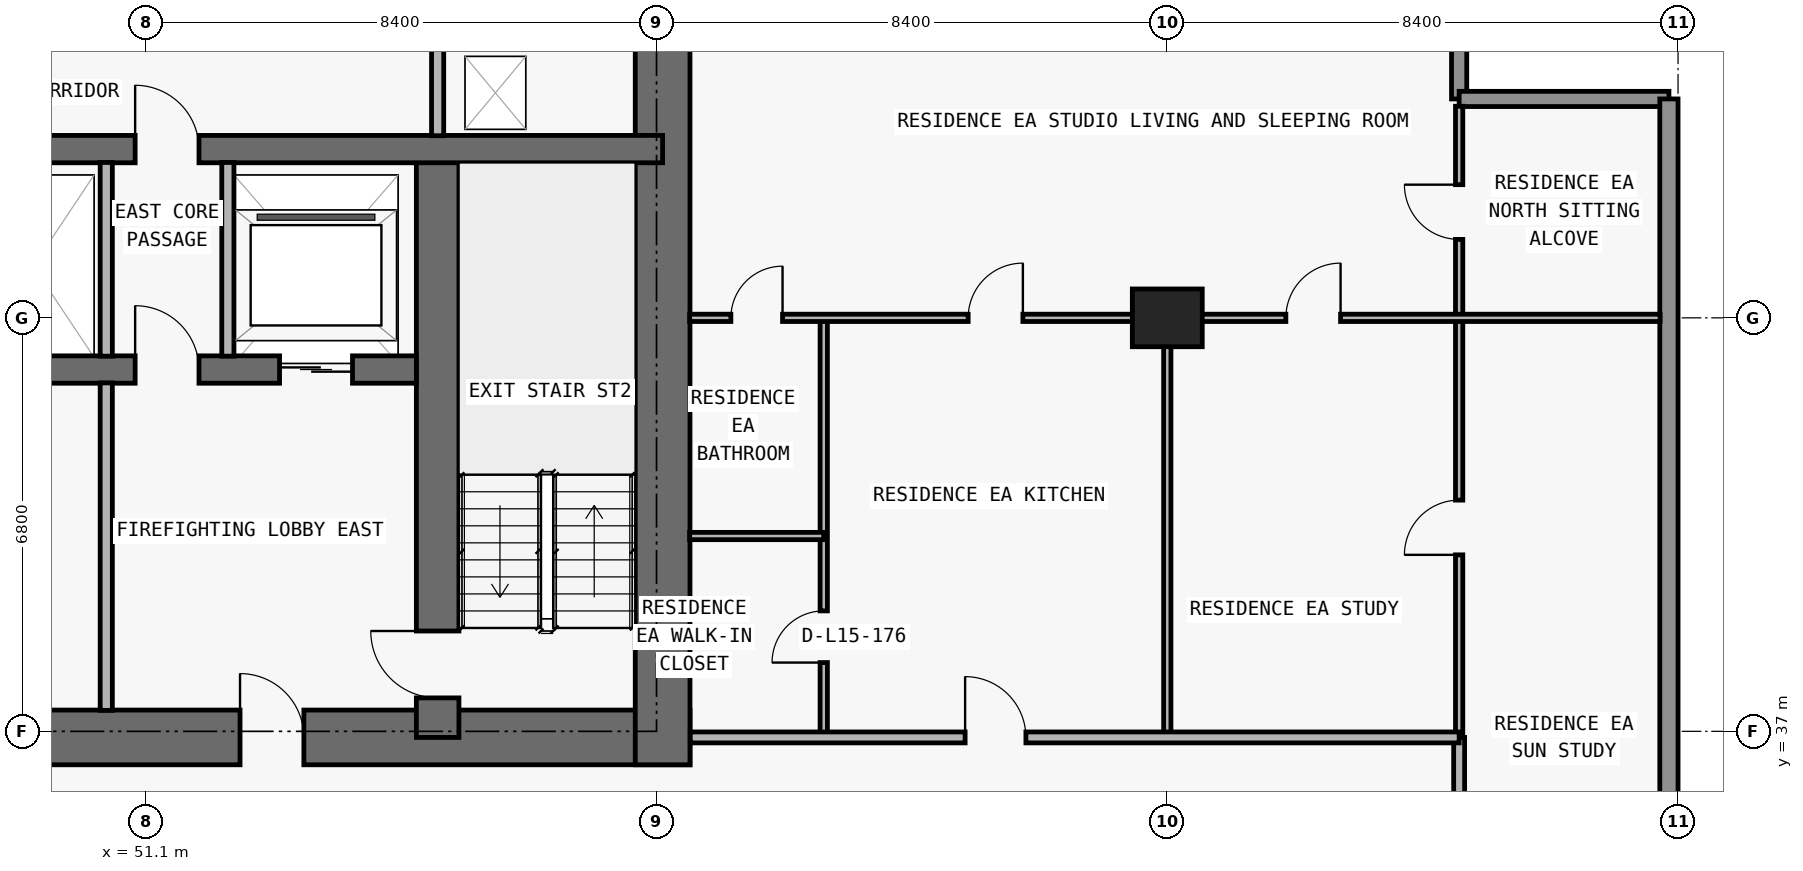
"""IFC4 building model, lengths in metres.
Left out: names, types, materials, properties, quantities, classifications, styles, units other than length and angle.
Written with IfcOpenShell. Run it as: python <this file> out.ifc"""

import sys

from ifc_helpers import new_model, si_unit, direction, frame, frame_2d, origin, origin_2d, place, context, subcontext, project, spatial, rectangle, extrude, element, fill, save


model = new_model("IFC4")
c1 = context("Model", 3, precision=1e-05, world=origin(), true_north=direction((0.0, 1.0)))
c2 = subcontext(c1, "Body", "Model", "MODEL_VIEW")
j1 = project(units=[si_unit("LENGTHUNIT", "METRE"), si_unit("PLANEANGLEUNIT", "RADIAN")], contexts=[c1])
p1 = place(None, origin())
s1 = spatial("IfcSite", under=j1, at=p1, CompositionType="ELEMENT")
p2 = place(p1, origin())
s2 = spatial("IfcBuilding", under=s1, at=p2, CompositionType="ELEMENT")
p3 = place(p2, frame((0.0, 0.0, 59.7)))
s3 = spatial("IfcBuildingStorey", under=s2, at=p3, CompositionType="ELEMENT", Elevation=59.7)
p4 = place(p3, frame((67.9, 43.8, 0.0), z_axis=(0.0, 0.0, 1.0), x_axis=(1.0, 0.0, 0.0)))
e1 = element("IfcColumn", 1, at=p4, inside=s3, PredefinedType="COLUMN", context=c2, shape_type="SweptSolid", body=[
    extrude(rectangle(XDim=1.15, YDim=0.95, at=origin_2d()), origin(), (0.0, 0.0, 1.0), 3.05),
])
p5 = place(p3, frame((17.75, 36.9, 0.0), z_axis=(0.0, 0.0, 1.0), x_axis=(1.0, 0.0, 0.0)))
e2 = element("IfcWall", 2, at=p5, inside=s3, PredefinedType="SHEAR", context=c2, shape_type="SweptSolid", body=[
    extrude(rectangle(XDim=42.3, YDim=0.9, at=frame_2d((21.15, 0.0))), origin(), (0.0, 0.0, 1.0), 3.05),
])
p6 = place(p5, frame((14.55, 0.0, 0.0)))
e3 = element("IfcOpeningElement", 3, at=p6, cuts=e2, PredefinedType="OPENING", context=c2, shape_type="SweptSolid", body=[
    extrude(rectangle(XDim=1.1, YDim=2.15, at=frame_2d((0.55, 1.075))), frame((0.0, 0.46, 0.0), z_axis=(0.0, -1.0, 0.0), x_axis=(1.0, 0.0, 0.0)), (0.0, 0.0, 1.0), 0.92),
])
p7 = place(p5, frame((6.4, 0.0, 0.0)))
e4 = element("IfcOpeningElement", 4, at=p7, cuts=e2, PredefinedType="OPENING", context=c2, shape_type="SweptSolid", body=[
    extrude(rectangle(XDim=1.05, YDim=2.15, at=frame_2d((0.525, 1.075))), frame((0.0, 0.46, 0.0), z_axis=(0.0, -1.0, 0.0), x_axis=(1.0, 0.0, 0.0)), (0.0, 0.0, 1.0), 0.92),
])
p8 = place(p5, frame((34.9, 0.0, 0.0)))
e5 = element("IfcOpeningElement", 5, at=p8, cuts=e2, PredefinedType="OPENING", context=c2, shape_type="SweptSolid", body=[
    extrude(rectangle(XDim=1.05, YDim=2.15, at=frame_2d((0.525, 1.075))), frame((0.0, 0.46, 0.0), z_axis=(0.0, -1.0, 0.0), x_axis=(1.0, 0.0, 0.0)), (0.0, 0.0, 1.0), 0.92),
])
p9 = place(p5, frame((11.012, 0.0, 0.0)))
e6 = element("IfcOpeningElement", 6, at=p9, cuts=e2, PredefinedType="OPENING", context=c2, shape_type="SweptSolid", body=[
    extrude(rectangle(XDim=1.05, YDim=2.15, at=frame_2d((0.525, 1.075))), frame((0.0, 0.46, 0.0), z_axis=(0.0, -1.0, 0.0), x_axis=(1.0, 0.0, 0.0)), (0.0, 0.0, 1.0), 0.92),
])
p10 = place(p5, frame((24.25, 0.0, 0.0)))
e7 = element("IfcOpeningElement", 7, at=p10, cuts=e2, PredefinedType="OPENING", context=c2, shape_type="SweptSolid", body=[
    extrude(rectangle(XDim=1.05, YDim=2.15, at=frame_2d((0.525, 1.075))), frame((0.0, 0.46, 0.0), z_axis=(0.0, -1.0, 0.0), x_axis=(1.0, 0.0, 0.0)), (0.0, 0.0, 1.0), 0.92),
])
p11 = place(p3, frame((59.6, 36.45, 0.0), z_axis=(0.0, 0.0, 1.0), x_axis=(0.0, 1.0, 0.0)))
e8 = element("IfcWall", 8, at=p11, inside=s3, PredefinedType="SHEAR", context=c2, shape_type="SweptSolid", body=[
    extrude(rectangle(XDim=14.15, YDim=0.9, at=frame_2d((7.075, 0.0))), origin(), (0.0, 0.0, 1.0), 3.05),
])
p12 = place(p3, frame((55.9, 36.9, 0.0), z_axis=(0.0, 0.0, 1.0), x_axis=(0.0, 1.0, 0.0)))
e9 = element("IfcWall", 9, at=p12, inside=s3, PredefinedType="SHEAR", context=c2, shape_type="SweptSolid", body=[
    extrude(rectangle(XDim=9.675, YDim=0.7, at=frame_2d((4.837, 0.0))), origin(), (0.0, 0.0, 1.0), 3.05),
])
p13 = place(p12, frame((0.65, 0.0, 0.0)))
e10 = element("IfcOpeningElement", 10, at=p13, cuts=e9, PredefinedType="OPENING", context=c2, shape_type="SweptSolid", body=[
    extrude(rectangle(XDim=1.1, YDim=2.15, at=frame_2d((0.55, 1.075))), frame((0.0, 0.36, 0.0), z_axis=(0.0, -1.0, 0.0), x_axis=(1.0, 0.0, 0.0)), (0.0, 0.0, 1.0), 0.72),
])
p14 = place(p3, frame((22.25, 42.95, 0.0), z_axis=(0.0, 0.0, 1.0), x_axis=(1.0, 0.0, 0.0)))
e11 = element("IfcWall", 11, at=p14, inside=s3, PredefinedType="SHEAR", context=c2, shape_type="SweptSolid", body=[
    extrude(rectangle(XDim=33.3, YDim=0.45, at=frame_2d((16.65, 0.0))), origin(), (0.0, 0.0, 1.0), 3.05),
])
p15 = place(p14, frame((1.05, 0.0, 0.0)))
e12 = element("IfcOpeningElement", 12, at=p15, cuts=e11, PredefinedType="OPENING", context=c2, shape_type="SweptSolid", body=[
    extrude(rectangle(XDim=1.2, YDim=2.2, at=frame_2d((0.6, 1.1))), frame((0.0, 0.235, 0.0), z_axis=(0.0, -1.0, 0.0), x_axis=(1.0, 0.0, 0.0)), (0.0, 0.0, 1.0), 0.47),
])
p16 = place(p14, frame((31.05, 0.0, 0.0)))
e13 = element("IfcOpeningElement", 13, at=p16, cuts=e11, PredefinedType="OPENING", context=c2, shape_type="SweptSolid", body=[
    extrude(rectangle(XDim=1.2, YDim=2.2, at=frame_2d((0.6, 1.1))), frame((0.0, 0.235, 0.0), z_axis=(0.0, -1.0, 0.0), x_axis=(1.0, 0.0, 0.0)), (0.0, 0.0, 1.0), 0.47),
])
p17 = place(p14, frame((13.5, 0.0, 0.0)))
e14 = element("IfcOpeningElement", 14, at=p17, cuts=e11, PredefinedType="OPENING", context=c2, shape_type="SweptSolid", body=[
    extrude(rectangle(XDim=1.1, YDim=2.2, at=frame_2d((0.55, 1.1))), frame((0.0, 0.235, 0.0), z_axis=(0.0, -1.0, 0.0), x_axis=(1.0, 0.0, 0.0)), (0.0, 0.0, 1.0), 0.47),
])
p18 = place(p14, frame((16.1, 0.0, 0.0)))
e15 = element("IfcOpeningElement", 15, at=p18, cuts=e11, PredefinedType="OPENING", context=c2, shape_type="SweptSolid", body=[
    extrude(rectangle(XDim=1.1, YDim=2.2, at=frame_2d((0.55, 1.1))), frame((0.0, 0.235, 0.0), z_axis=(0.0, -1.0, 0.0), x_axis=(1.0, 0.0, 0.0)), (0.0, 0.0, 1.0), 0.47),
])
p19 = place(p14, frame((18.7, 0.0, 0.0)))
e16 = element("IfcOpeningElement", 16, at=p19, cuts=e11, PredefinedType="OPENING", context=c2, shape_type="SweptSolid", body=[
    extrude(rectangle(XDim=1.1, YDim=2.2, at=frame_2d((0.55, 1.1))), frame((0.0, 0.235, 0.0), z_axis=(0.0, -1.0, 0.0), x_axis=(1.0, 0.0, 0.0)), (0.0, 0.0, 1.0), 0.47),
])
p20 = place(p14, frame((3.625, 0.0, 0.0)))
e17 = element("IfcOpeningElement", 17, at=p20, cuts=e11, PredefinedType="OPENING", context=c2, shape_type="SweptSolid", body=[
    extrude(rectangle(XDim=1.05, YDim=2.15, at=frame_2d((0.525, 1.075))), frame((0.0, 0.235, 0.0), z_axis=(0.0, -1.0, 0.0), x_axis=(1.0, 0.0, 0.0)), (0.0, 0.0, 1.0), 0.47),
])
p21 = place(p14, frame((28.675, 0.0, 0.0)))
e18 = element("IfcOpeningElement", 18, at=p21, cuts=e11, PredefinedType="OPENING", context=c2, shape_type="SweptSolid", body=[
    extrude(rectangle(XDim=1.05, YDim=2.15, at=frame_2d((0.525, 1.075))), frame((0.0, 0.235, 0.0), z_axis=(0.0, -1.0, 0.0), x_axis=(1.0, 0.0, 0.0)), (0.0, 0.0, 1.0), 0.47),
])
p22 = place(p3, frame((18.2, 46.575, 0.0), z_axis=(0.0, 0.0, 1.0), x_axis=(1.0, 0.0, 0.0)))
e19 = element("IfcWall", 19, at=p22, inside=s3, PredefinedType="SHEAR", context=c2, shape_type="SweptSolid", body=[
    extrude(rectangle(XDim=41.4, YDim=0.45, at=frame_2d((20.7, 0.0))), origin(), (0.0, 0.0, 1.0), 3.05),
])
p23 = place(p22, frame((7.7, 0.0, 0.0)))
e20 = element("IfcOpeningElement", 20, at=p23, cuts=e19, PredefinedType="OPENING", context=c2, shape_type="SweptSolid", body=[
    extrude(rectangle(XDim=1.0, YDim=2.2, at=frame_2d((0.5, 1.1))), frame((0.0, 0.235, 0.0), z_axis=(0.0, -1.0, 0.0), x_axis=(1.0, 0.0, 0.0)), (0.0, 0.0, 1.0), 0.47),
])
p24 = place(p22, frame((32.725, 0.0, 0.0)))
e21 = element("IfcOpeningElement", 21, at=p24, cuts=e19, PredefinedType="OPENING", context=c2, shape_type="SweptSolid", body=[
    extrude(rectangle(XDim=1.05, YDim=2.15, at=frame_2d((0.525, 1.075))), frame((0.0, 0.235, 0.0), z_axis=(0.0, -1.0, 0.0), x_axis=(1.0, 0.0, 0.0)), (0.0, 0.0, 1.0), 0.47),
])
p25 = place(p3, frame((72.7, 50.45, 0.0), z_axis=(0.0, 0.0, 1.0), x_axis=(0.0, -1.0, 0.0)))
e22 = element("IfcWall", 22, at=p25, inside=s3, PredefinedType="ELEMENTEDWALL", context=c2, shape_type="SweptSolid", body=[
    extrude(rectangle(XDim=3.05, YDim=0.25, at=frame_2d((1.525, 0.0))), origin(), (0.0, 0.0, 1.0), 3.05),
])
p26 = place(p3, frame((72.7, 47.4, 0.0), z_axis=(0.0, 0.0, 1.0), x_axis=(1.0, 0.0, 0.0)))
e23 = element("IfcWall", 23, at=p26, inside=s3, PredefinedType="ELEMENTEDWALL", context=c2, shape_type="SweptSolid", body=[
    extrude(rectangle(XDim=3.45, YDim=0.25, at=frame_2d((1.725, 0.0))), origin(), (0.0, 0.0, 1.0), 3.05),
])
p27 = place(p3, frame((76.15, 47.4, 0.0), z_axis=(0.0, 0.0, 1.0), x_axis=(0.0, -1.0, 0.0)))
e24 = element("IfcWall", 24, at=p27, inside=s3, PredefinedType="STANDARD", context=c2, shape_type="SweptSolid", body=[
    extrude(rectangle(XDim=20.6, YDim=0.3, at=frame_2d((10.3, 0.0))), origin(), (0.0, 0.0, 1.0), 3.05),
])
p28 = place(p3, frame((50.45, 37.345, 0.0), z_axis=(0.0, 0.0, 1.0), x_axis=(0.0, 1.0, 0.0)))
e25 = element("IfcWall", 25, at=p28, inside=s3, PredefinedType="PARTITIONING", context=c2, shape_type="SweptSolid", body=[
    extrude(rectangle(XDim=5.385, YDim=0.2, at=frame_2d((2.692, 0.0))), origin(), (0.0, 0.0, 1.0), 3.05),
])
for number, where, z_axis, x_axis in (
    (26, (50.45, 43.17, 0.0), (0.0, 0.0, 1.0), (0.0, 1.0, 0.0)),
    (27, (52.45, 43.17, 0.0), (0.0, 0.0, 1.0), (0.0, 1.0, 0.0)),
):
    element("IfcWall", number, at=place(p3, frame(where, z_axis=z_axis, x_axis=x_axis)), inside=s3, PredefinedType="PARTITIONING", context=c2, shape_type="SweptSolid", body=[
        extrude(rectangle(XDim=3.185, YDim=0.2, at=frame_2d((1.593, 0.0))), origin(), (0.0, 0.0, 1.0), 3.05),
    ])
p29 = place(p3, frame((55.9, 46.795, 0.0), z_axis=(0.0, 0.0, 1.0), x_axis=(0.0, 1.0, 0.0)))
e28 = element("IfcWall", 28, at=p29, inside=s3, PredefinedType="PARTITIONING", context=c2, shape_type="SweptSolid", body=[
    extrude(rectangle(XDim=3.06, YDim=0.2, at=frame_2d((1.53, 0.0))), origin(), (0.0, 0.0, 1.0), 3.05),
])
p30 = place(p3, frame((62.25, 36.9, 0.0), z_axis=(0.0, 0.0, 1.0), x_axis=(0.0, 1.0, 0.0)))
e29 = element("IfcWall", 29, at=p30, inside=s3, PredefinedType="PARTITIONING", context=c2, shape_type="SweptSolid", body=[
    extrude(rectangle(XDim=6.9, YDim=0.12, at=frame_2d((3.45, 0.0))), origin(), (0.0, 0.0, 1.0), 3.05),
])
p31 = place(p30, frame((1.231, 0.0, 0.0)))
e30 = element("IfcOpeningElement", 30, at=p31, cuts=e29, PredefinedType="OPENING", context=c2, shape_type="SweptSolid", body=[
    extrude(rectangle(XDim=0.85, YDim=2.1, at=frame_2d((0.425, 1.05))), frame((0.0, 0.07, 0.0), z_axis=(0.0, -1.0, 0.0), x_axis=(1.0, 0.0, 0.0)), (0.0, 0.0, 1.0), 0.14),
])
p32 = place(p3, frame((67.9, 36.9, 0.0), z_axis=(0.0, 0.0, 1.0), x_axis=(0.0, 1.0, 0.0)))
e31 = element("IfcWall", 31, at=p32, inside=s3, PredefinedType="PARTITIONING", context=c2, shape_type="SweptSolid", body=[
    extrude(rectangle(XDim=6.9, YDim=0.12, at=frame_2d((3.45, 0.0))), origin(), (0.0, 0.0, 1.0), 2.11),
])
p33 = place(p3, frame((72.7, 33.805, 0.0), z_axis=(0.0, 0.0, 1.0), x_axis=(0.0, 1.0, 0.0)))
e32 = element("IfcWall", 32, at=p33, inside=s3, PredefinedType="PARTITIONING", context=c2, shape_type="SweptSolid", body=[
    extrude(rectangle(XDim=3.095, YDim=0.18, at=frame_2d((1.547, 0.0))), origin(), (0.0, 0.0, 1.0), 3.05),
])
p34 = place(p3, frame((72.7, 36.905, 0.0), z_axis=(0.0, 0.0, 1.0), x_axis=(0.0, 1.0, 0.0)))
e33 = element("IfcWall", 33, at=p34, inside=s3, PredefinedType="PARTITIONING", context=c2, shape_type="SweptSolid", body=[
    extrude(rectangle(XDim=10.375, YDim=0.12, at=frame_2d((5.188, 0.0))), origin(), (0.0, 0.0, 1.0), 3.05),
])
p35 = place(p34, frame((2.998, 0.0, 0.0)))
e34 = element("IfcOpeningElement", 34, at=p35, cuts=e33, PredefinedType="OPENING", context=c2, shape_type="SweptSolid", body=[
    extrude(rectangle(XDim=0.9, YDim=2.15, at=frame_2d((0.45, 1.075))), frame((0.0, 0.07, 0.0), z_axis=(0.0, -1.0, 0.0), x_axis=(1.0, 0.0, 0.0)), (0.0, 0.0, 1.0), 0.14),
])
p36 = place(p34, frame((8.185, 0.0, 0.0)))
e35 = element("IfcOpeningElement", 35, at=p36, cuts=e33, PredefinedType="OPENING", context=c2, shape_type="SweptSolid", body=[
    extrude(rectangle(XDim=0.9, YDim=2.15, at=frame_2d((0.45, 1.075))), frame((0.0, 0.07, 0.0), z_axis=(0.0, -1.0, 0.0), x_axis=(1.0, 0.0, 0.0)), (0.0, 0.0, 1.0), 0.14),
])
p37 = place(p3, frame((60.055, 36.9, 0.0), z_axis=(0.0, 0.0, 1.0), x_axis=(1.0, 0.0, 0.0)))
e36 = element("IfcWall", 36, at=p37, inside=s3, PredefinedType="PARTITIONING", context=c2, shape_type="SweptSolid", body=[
    extrude(rectangle(XDim=12.645, YDim=0.18, at=frame_2d((6.323, 0.0))), origin(), (0.0, 0.0, 1.0), 3.05),
])
p38 = place(p37, frame((4.52, 0.0, 0.0)))
e37 = element("IfcOpeningElement", 37, at=p38, cuts=e36, PredefinedType="OPENING", context=c2, shape_type="SweptSolid", body=[
    extrude(rectangle(XDim=1.0, YDim=2.2, at=frame_2d((0.5, 1.1))), frame((0.0, 0.1, 0.0), z_axis=(0.0, -1.0, 0.0), x_axis=(1.0, 0.0, 0.0)), (0.0, 0.0, 1.0), 0.2),
])
p39 = place(p3, frame((60.045, 40.212, 0.0), z_axis=(0.0, 0.0, 1.0), x_axis=(1.0, 0.0, 0.0)))
e38 = element("IfcWall", 38, at=p39, inside=s3, PredefinedType="PARTITIONING", context=c2, shape_type="SweptSolid", body=[
    extrude(rectangle(XDim=2.205, YDim=0.12, at=frame_2d((1.103, 0.0))), origin(), (0.0, 0.0, 1.0), 3.05),
])
p40 = place(p3, frame((60.045, 43.8, 0.0), z_axis=(0.0, 0.0, 1.0), x_axis=(1.0, 0.0, 0.0)))
e39 = element("IfcWall", 39, at=p40, inside=s3, PredefinedType="PARTITIONING", context=c2, shape_type="SweptSolid", body=[
    extrude(rectangle(XDim=15.96, YDim=0.12, at=frame_2d((7.98, 0.0))), origin(), (0.0, 0.0, 1.0), 2.339),
])
p41 = place(p40, frame((9.805, 0.0, 0.0)))
e40 = element("IfcOpeningElement", 40, at=p41, cuts=e39, PredefinedType="OPENING", context=c2, shape_type="SweptSolid", body=[
    extrude(rectangle(XDim=0.9, YDim=2.15, at=frame_2d((0.45, 1.075))), frame((0.0, 0.07, 0.0), z_axis=(0.0, -1.0, 0.0), x_axis=(1.0, 0.0, 0.0)), (0.0, 0.0, 1.0), 0.14),
])
p42 = place(p40, frame((4.58, 0.0, 0.0)))
e41 = element("IfcOpeningElement", 41, at=p42, cuts=e39, PredefinedType="OPENING", context=c2, shape_type="SweptSolid", body=[
    extrude(rectangle(XDim=0.9, YDim=2.15, at=frame_2d((0.45, 1.075))), frame((0.0, 0.07, 0.0), z_axis=(0.0, -1.0, 0.0), x_axis=(1.0, 0.0, 0.0)), (0.0, 0.0, 1.0), 0.14),
])
p43 = place(p40, frame((0.677, 0.0, 0.0)))
e42 = element("IfcOpeningElement", 42, at=p43, cuts=e39, PredefinedType="OPENING", context=c2, shape_type="SweptSolid", body=[
    extrude(rectangle(XDim=0.85, YDim=2.1, at=frame_2d((0.425, 1.05))), frame((0.0, 0.07, 0.0), z_axis=(0.0, -1.0, 0.0), x_axis=(1.0, 0.0, 0.0)), (0.0, 0.0, 1.0), 0.14),
])
p44 = place(p16, origin())
e43 = element("IfcDoor", 43, at=p44, inside=s3, OperationType="DOUBLE_DOOR_SLIDING", PredefinedType="DOOR", context=c2, shape_type="SweptSolid", body=[
    extrude(rectangle(XDim=1.2, YDim=2.2, at=frame_2d((0.6, 1.1))), frame((0.0, 0.025, 0.0), z_axis=(0.0, -1.0, 0.0), x_axis=(1.0, 0.0, 0.0)), (0.0, 0.0, 1.0), 0.05),
])
fill(e13, e43)
p45 = place(p8, origin())
e44 = element("IfcDoor", 44, at=p45, inside=s3, OperationType="SINGLE_SWING_LEFT", PredefinedType="DOOR", context=c2, shape_type="SweptSolid", body=[
    extrude(rectangle(XDim=1.05, YDim=2.15, at=frame_2d((0.525, 1.075))), frame((0.0, 0.025, 0.0), z_axis=(0.0, -1.0, 0.0), x_axis=(1.0, 0.0, 0.0)), (0.0, 0.0, 1.0), 0.05),
])
fill(e5, e44)
p46 = place(p13, origin())
e45 = element("IfcDoor", 45, at=p46, inside=s3, OperationType="SINGLE_SWING_RIGHT", PredefinedType="DOOR", context=c2, shape_type="SweptSolid", body=[
    extrude(rectangle(XDim=1.1, YDim=2.15, at=frame_2d((0.55, 1.075))), frame((0.0, 0.025, 0.0), z_axis=(0.0, -1.0, 0.0), x_axis=(1.0, 0.0, 0.0)), (0.0, 0.0, 1.0), 0.05),
])
fill(e10, e45)
p47 = place(p21, origin())
e46 = element("IfcDoor", 46, at=p47, inside=s3, OperationType="SINGLE_SWING_LEFT", PredefinedType="DOOR", context=c2, shape_type="SweptSolid", body=[
    extrude(rectangle(XDim=1.05, YDim=2.15, at=frame_2d((0.525, 1.075))), frame((0.0, 0.025, 0.0), z_axis=(0.0, -1.0, 0.0), x_axis=(1.0, 0.0, 0.0)), (0.0, 0.0, 1.0), 0.05),
])
fill(e18, e46)
p48 = place(p24, origin())
e47 = element("IfcDoor", 47, at=p48, inside=s3, OperationType="SINGLE_SWING_LEFT", PredefinedType="DOOR", context=c2, shape_type="SweptSolid", body=[
    extrude(rectangle(XDim=1.05, YDim=2.15, at=frame_2d((0.525, 1.075))), frame((0.0, 0.025, 0.0), z_axis=(0.0, -1.0, 0.0), x_axis=(1.0, 0.0, 0.0)), (0.0, 0.0, 1.0), 0.05),
])
fill(e21, e47)
p49 = place(p41, origin())
e48 = element("IfcDoor", 48, at=p49, inside=s3, OperationType="SINGLE_SWING_RIGHT", PredefinedType="DOOR", context=c2, shape_type="SweptSolid", body=[
    extrude(rectangle(XDim=0.9, YDim=2.15, at=frame_2d((0.45, 1.075))), frame((0.0, 0.025, 0.0), z_axis=(0.0, -1.0, 0.0), x_axis=(1.0, 0.0, 0.0)), (0.0, 0.0, 1.0), 0.05),
])
fill(e40, e48)
p50 = place(p38, origin())
e49 = element("IfcDoor", 49, at=p50, inside=s3, OperationType="SINGLE_SWING_LEFT", PredefinedType="DOOR", context=c2, shape_type="SweptSolid", body=[
    extrude(rectangle(XDim=1.0, YDim=2.2, at=frame_2d((0.5, 1.1))), frame((0.0, 0.025, 0.0), z_axis=(0.0, -1.0, 0.0), x_axis=(1.0, 0.0, 0.0)), (0.0, 0.0, 1.0), 0.05),
])
fill(e37, e49)
p51 = place(p42, origin())
e50 = element("IfcDoor", 50, at=p51, inside=s3, OperationType="SINGLE_SWING_RIGHT", PredefinedType="DOOR", context=c2, shape_type="SweptSolid", body=[
    extrude(rectangle(XDim=0.9, YDim=2.15, at=frame_2d((0.45, 1.075))), frame((0.0, 0.025, 0.0), z_axis=(0.0, -1.0, 0.0), x_axis=(1.0, 0.0, 0.0)), (0.0, 0.0, 1.0), 0.05),
])
fill(e41, e50)
p52 = place(p31, origin())
e51 = element("IfcDoor", 51, at=p52, inside=s3, OperationType="SINGLE_SWING_LEFT", PredefinedType="DOOR", context=c2, shape_type="SweptSolid", body=[
    extrude(rectangle(XDim=0.85, YDim=2.1, at=frame_2d((0.425, 1.05))), frame((0.0, 0.025, 0.0), z_axis=(0.0, -1.0, 0.0), x_axis=(1.0, 0.0, 0.0)), (0.0, 0.0, 1.0), 0.05),
])
fill(e30, e51)
p53 = place(p43, origin())
e52 = element("IfcDoor", 52, at=p53, inside=s3, OperationType="SINGLE_SWING_RIGHT", PredefinedType="DOOR", context=c2, shape_type="SweptSolid", body=[
    extrude(rectangle(XDim=0.85, YDim=2.1, at=frame_2d((0.425, 1.05))), frame((0.0, 0.025, 0.0), z_axis=(0.0, -1.0, 0.0), x_axis=(1.0, 0.0, 0.0)), (0.0, 0.0, 1.0), 0.05),
])
fill(e42, e52)
p54 = place(p35, origin())
e53 = element("IfcDoor", 53, at=p54, inside=s3, OperationType="SINGLE_SWING_LEFT", PredefinedType="DOOR", context=c2, shape_type="SweptSolid", body=[
    extrude(rectangle(XDim=0.9, YDim=2.15, at=frame_2d((0.45, 1.075))), frame((0.0, 0.025, 0.0), z_axis=(0.0, -1.0, 0.0), x_axis=(1.0, 0.0, 0.0)), (0.0, 0.0, 1.0), 0.05),
])
fill(e34, e53)
p55 = place(p36, origin())
e54 = element("IfcDoor", 54, at=p55, inside=s3, OperationType="SINGLE_SWING_RIGHT", PredefinedType="DOOR", context=c2, shape_type="SweptSolid", body=[
    extrude(rectangle(XDim=0.9, YDim=2.15, at=frame_2d((0.45, 1.075))), frame((0.0, 0.025, 0.0), z_axis=(0.0, -1.0, 0.0), x_axis=(1.0, 0.0, 0.0)), (0.0, 0.0, 1.0), 0.05),
])
fill(e35, e54)
save(model, sys.argv[1])
